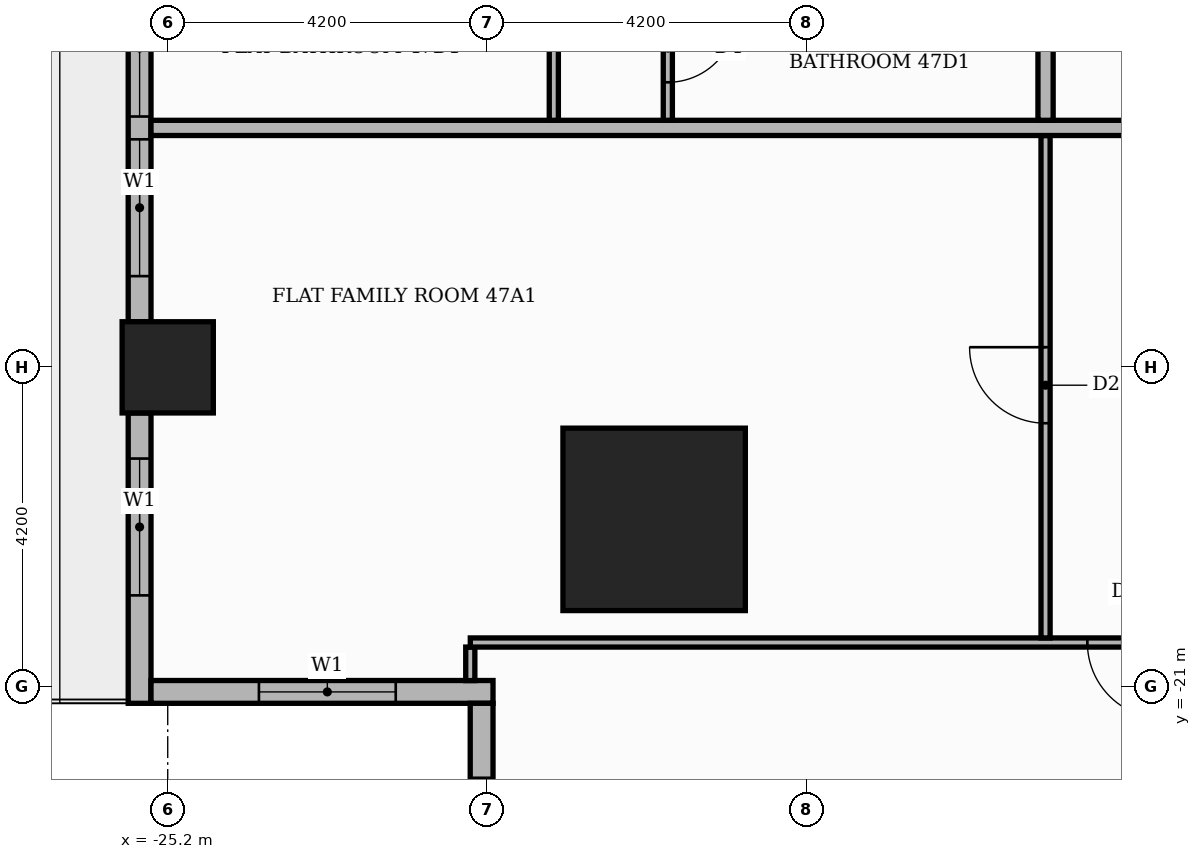
"""IFC4 building model, lengths in metres.
Left out: names, types, materials, properties, quantities, classifications, styles, units other than length and angle.
Written with IfcOpenShell. Run it as: python <this file> out.ifc"""

import sys

from ifc_helpers import new_model, si_unit, direction, frame, frame_2d, origin, origin_2d, place, context, subcontext, project, spatial, rectangle, extrude, element, fill, save


model = new_model("IFC4")
c1 = context("Model", 3, precision=1e-05, world=origin(), true_north=direction((0.0, 1.0)))
c2 = subcontext(c1, "Body", "Model", "MODEL_VIEW")
j1 = project(units=[si_unit("LENGTHUNIT", "METRE"), si_unit("PLANEANGLEUNIT", "RADIAN")], contexts=[c1])
p1 = place(None, origin())
s1 = spatial("IfcSite", under=j1, at=p1, CompositionType="ELEMENT")
p2 = place(p1, origin())
s2 = spatial("IfcBuilding", under=s1, at=p2, CompositionType="ELEMENT")
p3 = place(p2, frame((0.0, 0.0, 200.1)))
s3 = spatial("IfcBuildingStorey", under=s2, at=p3, CompositionType="ELEMENT", Elevation=200.1)
p4 = place(p3, frame((-18.8, -18.8, 0.0), z_axis=(0.0, 0.0, 1.0), x_axis=(1.0, 0.0, 0.0)))
e1 = element("IfcColumn", 1, at=p4, inside=s3, PredefinedType="COLUMN", context=c2, shape_type="SweptSolid", body=[
    extrude(rectangle(XDim=2.4, YDim=2.4, at=origin_2d()), origin(), (0.0, 0.0, 1.0), 3.9),
])
p5 = place(p3, frame((-25.2, -16.8, 0.0), z_axis=(0.0, 0.0, 1.0), x_axis=(1.0, 0.0, 0.0)))
e2 = element("IfcColumn", 2, at=p5, inside=s3, PredefinedType="COLUMN", context=c2, shape_type="SweptSolid", body=[
    extrude(rectangle(XDim=1.2, YDim=1.2, at=origin_2d()), origin(), (0.0, 0.0, 1.0), 3.9),
])
p6 = place(p3, frame((-25.57, -9.0, 0.0), z_axis=(0.0, 0.0, 1.0), x_axis=(0.0, -1.0, 0.0)))
e3 = element("IfcWall", 3, at=p6, inside=s3, PredefinedType="STANDARD", context=c2, shape_type="SweptSolid", body=[
    extrude(rectangle(XDim=7.2, YDim=0.3, at=frame_2d((3.6, 0.0))), origin(), (0.0, 0.0, 1.0), 3.48),
])
p7 = place(p6, frame((0.6, 0.0, 0.9)))
e4 = element("IfcOpeningElement", 4, at=p7, cuts=e3, PredefinedType="OPENING", context=c2, shape_type="SweptSolid", body=[
    extrude(rectangle(XDim=1.8, YDim=2.1, at=frame_2d((0.9, 1.05))), frame((0.0, 0.16, 0.0), z_axis=(0.0, -1.0, 0.0), x_axis=(1.0, 0.0, 0.0)), (0.0, 0.0, 1.0), 0.32),
])
p8 = place(p6, frame((2.7, 0.0, 0.9)))
e5 = element("IfcOpeningElement", 5, at=p8, cuts=e3, PredefinedType="OPENING", context=c2, shape_type="SweptSolid", body=[
    extrude(rectangle(XDim=1.8, YDim=2.1, at=frame_2d((0.9, 1.05))), frame((0.0, 0.16, 0.0), z_axis=(0.0, -1.0, 0.0), x_axis=(1.0, 0.0, 0.0)), (0.0, 0.0, 1.0), 0.32),
])
p9 = place(p6, frame((4.8, 0.0, 0.9)))
e6 = element("IfcOpeningElement", 6, at=p9, cuts=e3, PredefinedType="OPENING", context=c2, shape_type="SweptSolid", body=[
    extrude(rectangle(XDim=1.8, YDim=2.1, at=frame_2d((0.9, 1.05))), frame((0.0, 0.16, 0.0), z_axis=(0.0, -1.0, 0.0), x_axis=(1.0, 0.0, 0.0)), (0.0, 0.0, 1.0), 0.32),
])
p10 = place(p3, frame((-25.57, -17.4, 0.0), z_axis=(0.0, 0.0, 1.0), x_axis=(0.0, -1.0, 0.0)))
e7 = element("IfcWall", 7, at=p10, inside=s3, PredefinedType="STANDARD", context=c2, shape_type="SweptSolid", body=[
    extrude(rectangle(XDim=3.82, YDim=0.3, at=frame_2d((1.91, 0.0))), origin(), (0.0, 0.0, 1.0), 3.48),
])
p11 = place(p10, frame((0.6, 0.0, 0.9)))
e8 = element("IfcOpeningElement", 8, at=p11, cuts=e7, PredefinedType="OPENING", context=c2, shape_type="SweptSolid", body=[
    extrude(rectangle(XDim=1.8, YDim=2.1, at=frame_2d((0.9, 1.05))), frame((0.0, 0.16, 0.0), z_axis=(0.0, -1.0, 0.0), x_axis=(1.0, 0.0, 0.0)), (0.0, 0.0, 1.0), 0.32),
])
p12 = place(p3, frame((-25.42, -21.07, 0.0), z_axis=(0.0, 0.0, 1.0), x_axis=(1.0, 0.0, 0.0)))
e9 = element("IfcWall", 9, at=p12, inside=s3, PredefinedType="STANDARD", context=c2, shape_type="SweptSolid", body=[
    extrude(rectangle(XDim=4.5, YDim=0.3, at=frame_2d((2.25, 0.0))), origin(), (0.0, 0.0, 1.0), 3.48),
])
p13 = place(p12, frame((1.42, 0.0, 0.9)))
e10 = element("IfcOpeningElement", 10, at=p13, cuts=e9, PredefinedType="OPENING", context=c2, shape_type="SweptSolid", body=[
    extrude(rectangle(XDim=1.8, YDim=2.1, at=frame_2d((0.9, 1.05))), frame((0.0, 0.16, 0.0), z_axis=(0.0, -1.0, 0.0), x_axis=(1.0, 0.0, 0.0)), (0.0, 0.0, 1.0), 0.32),
])
p14 = place(p3, frame((-21.07, -21.22, 0.0), z_axis=(0.0, 0.0, 1.0), x_axis=(0.0, -1.0, 0.0)))
e11 = element("IfcWall", 11, at=p14, inside=s3, PredefinedType="STANDARD", context=c2, shape_type="SweptSolid", body=[
    extrude(rectangle(XDim=4.5, YDim=0.3, at=frame_2d((2.25, 0.0))), origin(), (0.0, 0.0, 1.0), 3.48),
])
p15 = place(p14, frame((0.98, 0.0, 0.9)))
e12 = element("IfcOpeningElement", 12, at=p15, cuts=e11, PredefinedType="OPENING", context=c2, shape_type="SweptSolid", body=[
    extrude(rectangle(XDim=1.8, YDim=2.1, at=frame_2d((0.9, 1.05))), frame((0.0, 0.16, 0.0), z_axis=(0.0, -1.0, 0.0), x_axis=(1.0, 0.0, 0.0)), (0.0, 0.0, 1.0), 0.32),
])
p16 = place(p3, frame((-21.219, -20.921, 0.0), z_axis=(0.0, 0.0, 1.0), x_axis=(0.0, 1.0, 0.0)))
e13 = element("IfcWall", 13, at=p16, inside=s3, PredefinedType="PARTITIONING", context=c2, shape_type="SweptSolid", body=[
    extrude(rectangle(XDim=0.441, YDim=0.12, at=frame_2d((0.22, 0.0))), origin(), (0.0, 0.0, 1.0), 3.48),
])
p17 = place(p3, frame((-21.219, -20.42, 0.0), z_axis=(0.0, 0.0, 1.0), x_axis=(1.0, 0.0, 0.0)))
e14 = element("IfcWall", 14, at=p17, inside=s3, PredefinedType="PARTITIONING", context=c2, shape_type="SweptSolid", body=[
    extrude(rectangle(XDim=34.769, YDim=0.12, at=frame_2d((17.385, 0.0))), origin(), (0.0, 0.0, 1.0), 3.48),
])
p18 = place(p17, frame((8.119, 0.0, 0.0)))
e15 = element("IfcOpeningElement", 15, at=p18, cuts=e14, PredefinedType="OPENING", context=c2, shape_type="SweptSolid", body=[
    extrude(rectangle(XDim=1.0, YDim=2.1, at=frame_2d((0.5, 1.05))), frame((0.0, 0.07, 0.0), z_axis=(0.0, -1.0, 0.0), x_axis=(1.0, 0.0, 0.0)), (0.0, 0.0, 1.0), 0.14),
])
p19 = place(p17, frame((13.419, 0.0, 0.0)))
e16 = element("IfcOpeningElement", 16, at=p19, cuts=e14, PredefinedType="OPENING", context=c2, shape_type="SweptSolid", body=[
    extrude(rectangle(XDim=0.9, YDim=2.1, at=frame_2d((0.45, 1.05))), frame((0.0, 0.07, 0.0), z_axis=(0.0, -1.0, 0.0), x_axis=(1.0, 0.0, 0.0)), (0.0, 0.0, 1.0), 0.14),
])
p20 = place(p17, frame((23.919, 0.0, 0.0)))
e17 = element("IfcOpeningElement", 17, at=p20, cuts=e14, PredefinedType="OPENING", context=c2, shape_type="SweptSolid", body=[
    extrude(rectangle(XDim=0.9, YDim=2.1, at=frame_2d((0.45, 1.05))), frame((0.0, 0.07, 0.0), z_axis=(0.0, -1.0, 0.0), x_axis=(1.0, 0.0, 0.0)), (0.0, 0.0, 1.0), 0.14),
])
p21 = place(p17, frame((31.269, 0.0, 0.0)))
e18 = element("IfcOpeningElement", 18, at=p21, cuts=e14, PredefinedType="OPENING", context=c2, shape_type="SweptSolid", body=[
    extrude(rectangle(XDim=0.9, YDim=2.1, at=frame_2d((0.45, 1.05))), frame((0.0, 0.07, 0.0), z_axis=(0.0, -1.0, 0.0), x_axis=(1.0, 0.0, 0.0)), (0.0, 0.0, 1.0), 0.14),
])
p22 = place(p3, frame((-13.65, -20.36, 0.0), z_axis=(0.0, 0.0, 1.0), x_axis=(0.0, 1.0, 0.0)))
e19 = element("IfcWall", 19, at=p22, inside=s3, PredefinedType="PARTITIONING", context=c2, shape_type="SweptSolid", body=[
    extrude(rectangle(XDim=6.61, YDim=0.12, at=frame_2d((3.305, 0.0))), origin(), (0.0, 0.0, 1.0), 3.48),
])
p23 = place(p22, frame((2.825, 0.0, 0.0)))
e20 = element("IfcOpeningElement", 20, at=p23, cuts=e19, PredefinedType="OPENING", context=c2, shape_type="SweptSolid", body=[
    extrude(rectangle(XDim=1.0, YDim=2.1, at=frame_2d((0.5, 1.05))), frame((0.0, 0.07, 0.0), z_axis=(0.0, -1.0, 0.0), x_axis=(1.0, 0.0, 0.0)), (0.0, 0.0, 1.0), 0.14),
])
p24 = place(p3, frame((-25.42, -13.65, 0.0), z_axis=(0.0, 0.0, 1.0), x_axis=(1.0, 0.0, 0.0)))
e21 = element("IfcWall", 21, at=p24, inside=s3, PredefinedType="PARTITIONING", context=c2, shape_type="SweptSolid", body=[
    extrude(rectangle(XDim=39.07, YDim=0.2, at=frame_2d((19.535, 0.0))), origin(), (0.0, 0.0, 1.0), 3.48),
])
p25 = place(p24, frame((14.37, 0.0, 0.0)))
e22 = element("IfcOpeningElement", 22, at=p25, cuts=e21, PredefinedType="OPENING", context=c2, shape_type="SweptSolid", body=[
    extrude(rectangle(XDim=1.1, YDim=2.4, at=frame_2d((0.55, 1.2))), frame((0.0, 0.11, 0.0), z_axis=(0.0, -1.0, 0.0), x_axis=(1.0, 0.0, 0.0)), (0.0, 0.0, 1.0), 0.22),
])
p26 = place(p3, frame((-20.12, -13.55, 0.0), z_axis=(0.0, 0.0, 1.0), x_axis=(0.0, 1.0, 0.0)))
e23 = element("IfcWall", 23, at=p26, inside=s3, PredefinedType="PARTITIONING", context=c2, shape_type="SweptSolid", body=[
    extrude(rectangle(XDim=1.94, YDim=0.12, at=frame_2d((0.97, 0.0))), origin(), (0.0, 0.0, 1.0), 3.48),
])
p27 = place(p3, frame((-18.62, -13.55, 0.0), z_axis=(0.0, 0.0, 1.0), x_axis=(0.0, 1.0, 0.0)))
e24 = element("IfcWall", 24, at=p27, inside=s3, PredefinedType="PARTITIONING", context=c2, shape_type="SweptSolid", body=[
    extrude(rectangle(XDim=1.94, YDim=0.12, at=frame_2d((0.97, 0.0))), origin(), (0.0, 0.0, 1.0), 3.48),
])
p28 = place(p27, frame((0.5, 0.0, 0.0)))
e25 = element("IfcOpeningElement", 25, at=p28, cuts=e24, PredefinedType="OPENING", context=c2, shape_type="SweptSolid", body=[
    extrude(rectangle(XDim=0.9, YDim=2.1, at=frame_2d((0.45, 1.05))), frame((0.0, 0.07, 0.0), z_axis=(0.0, -1.0, 0.0), x_axis=(1.0, 0.0, 0.0)), (0.0, 0.0, 1.0), 0.14),
])
p29 = place(p3, frame((-13.65, -13.55, 0.0), z_axis=(0.0, 0.0, 1.0), x_axis=(0.0, 1.0, 0.0)))
e26 = element("IfcWall", 26, at=p29, inside=s3, PredefinedType="PARTITIONING", context=c2, shape_type="SweptSolid", body=[
    extrude(rectangle(XDim=27.1, YDim=0.2, at=frame_2d((13.55, 0.0))), origin(), (0.0, 0.0, 1.0), 3.48),
])
p30 = place(p29, frame((23.5, 0.0, 0.0)))
e27 = element("IfcOpeningElement", 27, at=p30, cuts=e26, PredefinedType="OPENING", context=c2, shape_type="SweptSolid", body=[
    extrude(rectangle(XDim=1.1, YDim=2.4, at=frame_2d((0.55, 1.2))), frame((0.0, 0.11, 0.0), z_axis=(0.0, -1.0, 0.0), x_axis=(1.0, 0.0, 0.0)), (0.0, 0.0, 1.0), 0.22),
])
p31 = place(p8, origin())
e28 = element("IfcWindow", 28, at=p31, inside=s3, PartitioningType="SINGLE_PANEL", PredefinedType="WINDOW", context=c2, shape_type="SweptSolid", body=[
    extrude(rectangle(XDim=1.8, YDim=2.1, at=frame_2d((0.9, 1.05))), frame((0.0, 0.03, 0.0), z_axis=(0.0, -1.0, 0.0), x_axis=(1.0, 0.0, 0.0)), (0.0, 0.0, 1.0), 0.06),
])
fill(e5, e28)
p32 = place(p9, origin())
e29 = element("IfcWindow", 29, at=p32, inside=s3, PartitioningType="SINGLE_PANEL", PredefinedType="WINDOW", context=c2, shape_type="SweptSolid", body=[
    extrude(rectangle(XDim=1.8, YDim=2.1, at=frame_2d((0.9, 1.05))), frame((0.0, 0.03, 0.0), z_axis=(0.0, -1.0, 0.0), x_axis=(1.0, 0.0, 0.0)), (0.0, 0.0, 1.0), 0.06),
])
fill(e6, e29)
p33 = place(p11, origin())
e30 = element("IfcWindow", 30, at=p33, inside=s3, PartitioningType="SINGLE_PANEL", PredefinedType="WINDOW", context=c2, shape_type="SweptSolid", body=[
    extrude(rectangle(XDim=1.8, YDim=2.1, at=frame_2d((0.9, 1.05))), frame((0.0, 0.03, 0.0), z_axis=(0.0, -1.0, 0.0), x_axis=(1.0, 0.0, 0.0)), (0.0, 0.0, 1.0), 0.06),
])
fill(e8, e30)
p34 = place(p13, origin())
e31 = element("IfcWindow", 31, at=p34, inside=s3, PartitioningType="SINGLE_PANEL", PredefinedType="WINDOW", context=c2, shape_type="SweptSolid", body=[
    extrude(rectangle(XDim=1.8, YDim=2.1, at=frame_2d((0.9, 1.05))), frame((0.0, 0.03, 0.0), z_axis=(0.0, -1.0, 0.0), x_axis=(1.0, 0.0, 0.0)), (0.0, 0.0, 1.0), 0.06),
])
fill(e10, e31)
p35 = place(p15, origin())
e32 = element("IfcWindow", 32, at=p35, inside=s3, PartitioningType="SINGLE_PANEL", PredefinedType="WINDOW", context=c2, shape_type="SweptSolid", body=[
    extrude(rectangle(XDim=1.8, YDim=2.1, at=frame_2d((0.9, 1.05))), frame((0.0, 0.03, 0.0), z_axis=(0.0, -1.0, 0.0), x_axis=(1.0, 0.0, 0.0)), (0.0, 0.0, 1.0), 0.06),
])
fill(e12, e32)
p36 = place(p23, origin())
e33 = element("IfcDoor", 33, at=p36, inside=s3, OperationType="SINGLE_SWING_RIGHT", PredefinedType="DOOR", context=c2, shape_type="SweptSolid", body=[
    extrude(rectangle(XDim=1.0, YDim=2.1, at=frame_2d((0.5, 1.05))), frame((0.0, 0.025, 0.0), z_axis=(0.0, -1.0, 0.0), x_axis=(1.0, 0.0, 0.0)), (0.0, 0.0, 1.0), 0.05),
])
fill(e20, e33)
p37 = place(p18, frame((1.0, 0.0, 0.0), z_axis=(0.0, 0.0, 1.0), x_axis=(-1.0, 0.0, 0.0)))
e34 = element("IfcDoor", 34, at=p37, inside=s3, OperationType="SINGLE_SWING_RIGHT", PredefinedType="DOOR", context=c2, shape_type="SweptSolid", body=[
    extrude(rectangle(XDim=1.0, YDim=2.1, at=frame_2d((0.5, 1.05))), frame((0.0, 0.025, 0.0), z_axis=(0.0, -1.0, 0.0), x_axis=(1.0, 0.0, 0.0)), (0.0, 0.0, 1.0), 0.05),
])
fill(e15, e34)
p38 = place(p28, frame((0.9, 0.0, 0.0), z_axis=(0.0, 0.0, 1.0), x_axis=(-1.0, 0.0, 0.0)))
e35 = element("IfcDoor", 35, at=p38, inside=s3, OperationType="SINGLE_SWING_RIGHT", PredefinedType="DOOR", context=c2, shape_type="SweptSolid", body=[
    extrude(rectangle(XDim=0.9, YDim=2.1, at=frame_2d((0.45, 1.05))), frame((0.0, 0.025, 0.0), z_axis=(0.0, -1.0, 0.0), x_axis=(1.0, 0.0, 0.0)), (0.0, 0.0, 1.0), 0.05),
])
fill(e25, e35)
save(model, sys.argv[1])
